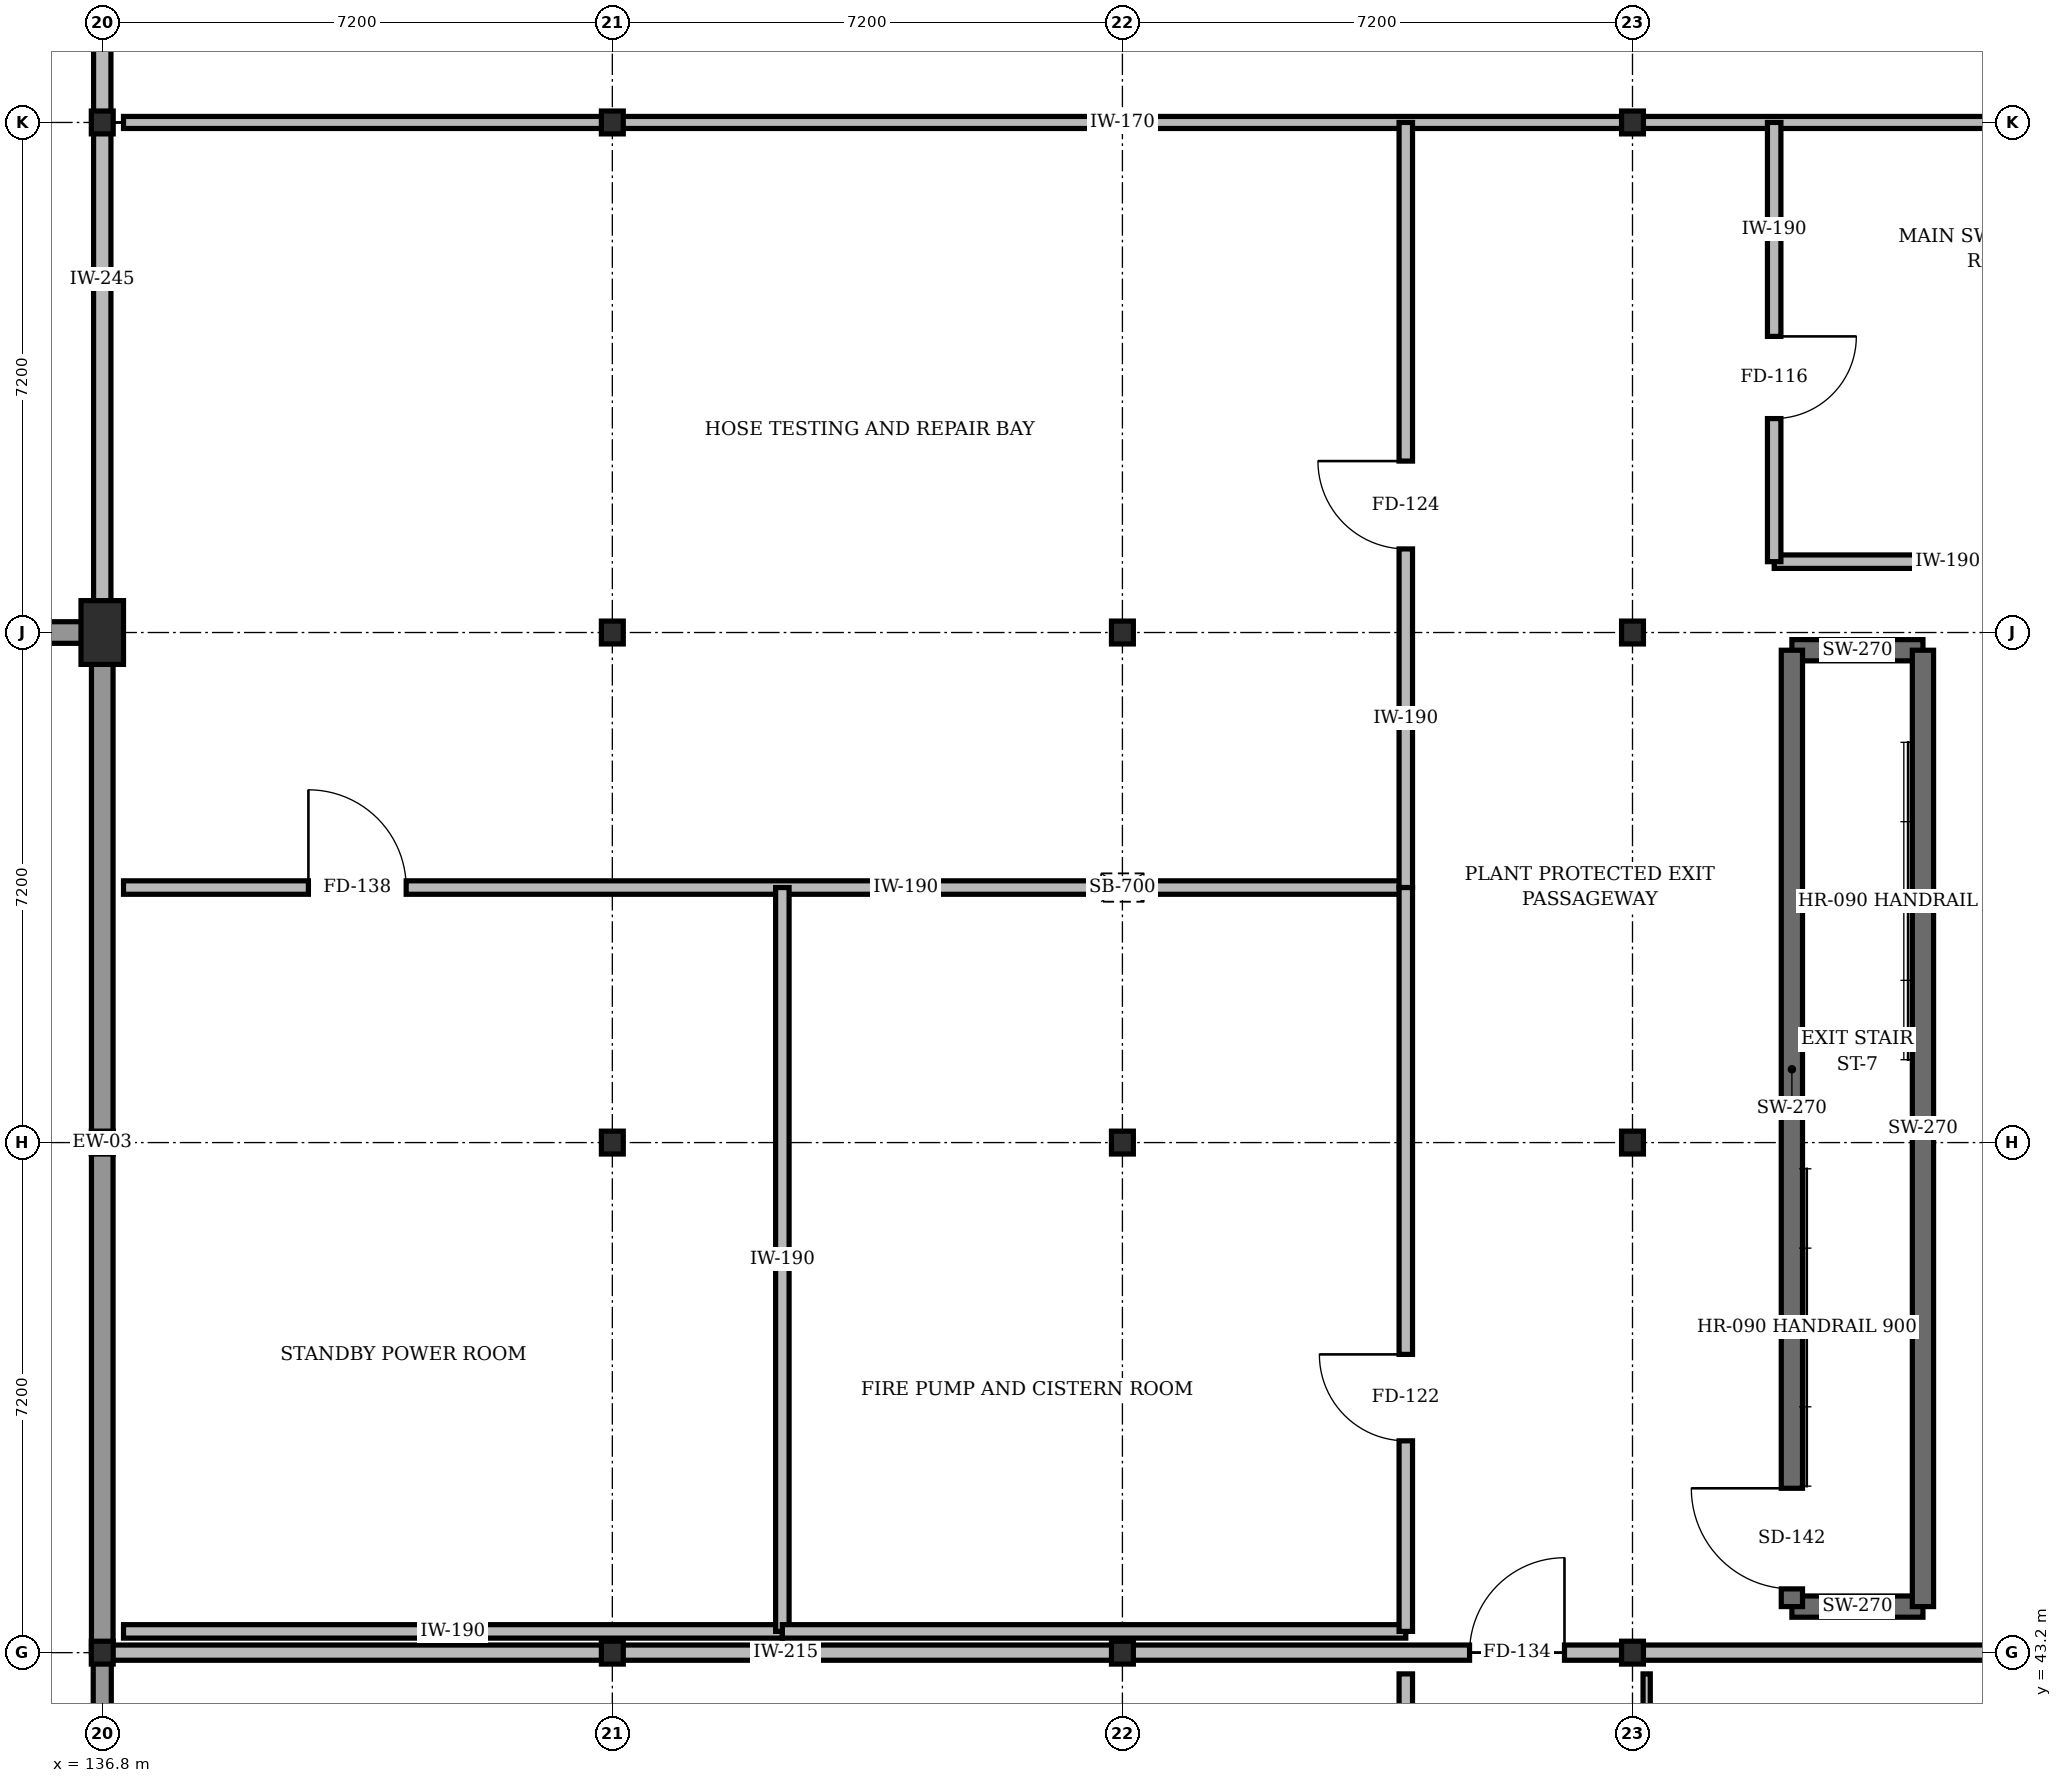
"""IFC4 building model, lengths in metres.
Left out: names, types, materials, properties, quantities, classifications, styles, units other than length and angle.
Written with IfcOpenShell. Run it as: python <this file> out.ifc"""

import sys

from ifc_helpers import new_model, si_unit, direction, frame, frame_2d, origin, origin_2d, place, context, subcontext, project, spatial, rectangle, i_section, extrude, element, fill, save


model = new_model("IFC4")
c1 = context("Model", 3, precision=1e-05, world=origin(), true_north=direction((0.0, 1.0)))
c2 = subcontext(c1, "Body", "Model", "MODEL_VIEW")
j1 = project(units=[si_unit("LENGTHUNIT", "METRE"), si_unit("PLANEANGLEUNIT", "RADIAN")], contexts=[c1])
p1 = place(None, origin())
s1 = spatial("IfcSite", under=j1, at=p1, CompositionType="ELEMENT")
p2 = place(p1, origin())
s2 = spatial("IfcBuilding", under=s1, at=p2, CompositionType="ELEMENT")
p3 = place(p2, origin())
s3 = spatial("IfcBuildingStorey", under=s2, at=p3, CompositionType="ELEMENT", Elevation=0.0)
for number, where, z_axis, x_axis in (
    (1, (136.8, 43.2, 0.0), (0.0, 0.0, 1.0), (1.0, 0.0, 0.0)),
    (2, (136.8, 50.4, 0.0), (0.0, 0.0, 1.0), (1.0, 0.0, 0.0)),
):
    element("IfcColumn", number, at=place(p3, frame(where, z_axis=z_axis, x_axis=x_axis)), inside=s3, PredefinedType="COLUMN", context=c2, shape_type="SweptSolid", body=[
        extrude(i_section(OverallWidth=0.309, OverallDepth=0.323, WebThickness=0.014, FlangeThickness=0.023, at=origin_2d()), origin(), (0.0, 0.0, 1.0), 6.0),
    ])
p4 = place(p3, frame((136.8, 57.6, 0.0), z_axis=(0.0, 0.0, 1.0), x_axis=(1.0, 0.0, 0.0)))
e3 = element("IfcColumn", 3, at=p4, inside=s3, PredefinedType="PILASTER", context=c2, shape_type="SweptSolid", body=[
    extrude(rectangle(XDim=0.6, YDim=0.9, at=origin_2d()), origin(), (0.0, 0.0, 1.0), 6.0),
])
for number, where, z_axis, x_axis in (
    (4, (136.8, 64.8, 0.0), (0.0, 0.0, 1.0), (1.0, 0.0, 0.0)),
    (5, (144.0, 43.2, 0.0), (0.0, 0.0, 1.0), (1.0, 0.0, 0.0)),
    (6, (144.0, 50.4, 0.0), (0.0, 0.0, 1.0), (1.0, 0.0, 0.0)),
    (7, (144.0, 57.6, 0.0), (0.0, 0.0, 1.0), (1.0, 0.0, 0.0)),
    (8, (144.0, 64.8, 0.0), (0.0, 0.0, 1.0), (1.0, 0.0, 0.0)),
    (9, (151.2, 43.2, 0.0), (0.0, 0.0, 1.0), (1.0, 0.0, 0.0)),
    (10, (151.2, 50.4, 0.0), (0.0, 0.0, 1.0), (1.0, 0.0, 0.0)),
    (11, (151.2, 57.6, 0.0), (0.0, 0.0, 1.0), (1.0, 0.0, 0.0)),
    (12, (158.4, 43.2, 0.0), (0.0, 0.0, 1.0), (1.0, 0.0, 0.0)),
    (13, (158.4, 50.4, 0.0), (0.0, 0.0, 1.0), (1.0, 0.0, 0.0)),
    (14, (158.4, 57.6, 0.0), (0.0, 0.0, 1.0), (1.0, 0.0, 0.0)),
    (15, (158.4, 64.8, 0.0), (0.0, 0.0, 1.0), (1.0, 0.0, 0.0)),
):
    element("IfcColumn", number, at=place(p3, frame(where, z_axis=z_axis, x_axis=x_axis)), inside=s3, PredefinedType="COLUMN", context=c2, shape_type="SweptSolid", body=[
        extrude(i_section(OverallWidth=0.309, OverallDepth=0.323, WebThickness=0.014, FlangeThickness=0.023, at=origin_2d()), origin(), (0.0, 0.0, 1.0), 6.0),
    ])
p5 = place(p3, frame((136.8, 57.6, 0.0), z_axis=(0.0, 0.0, 1.0), x_axis=(-1.0, 0.0, 0.0)))
e16 = element("IfcWall", 16, at=p5, inside=s3, PredefinedType="STANDARD", context=c2, shape_type="SweptSolid", body=[
    extrude(rectangle(XDim=7.2, YDim=0.305, at=frame_2d((3.6, 0.0))), origin(), (0.0, 0.0, 1.0), 5.022),
])
p6 = place(p5, frame((2.63, 0.0, 0.0)))
e17 = element("IfcOpeningElement", 17, at=p6, cuts=e16, PredefinedType="OPENING", context=c2, shape_type="SweptSolid", body=[
    extrude(rectangle(XDim=1.94, YDim=2.38, at=frame_2d((0.97, 1.19))), frame((0.0, 0.162, 0.0), z_axis=(0.0, -1.0, 0.0), x_axis=(1.0, 0.0, 0.0)), (0.0, 0.0, 1.0), 0.325),
])
p7 = place(p3, frame((136.8, 57.6, 0.0), z_axis=(0.0, 0.0, 1.0), x_axis=(0.0, -1.0, 0.0)))
e18 = element("IfcWall", 18, at=p7, inside=s3, PredefinedType="STANDARD", context=c2, shape_type="SweptSolid", body=[
    extrude(rectangle(XDim=14.4, YDim=0.305, at=frame_2d((7.2, 0.0))), origin(), (0.0, 0.0, 1.0), 5.022),
])
p8 = place(p3, frame((136.8, 43.2, 0.0), z_axis=(0.0, 0.0, 1.0), x_axis=(0.0, -1.0, 0.0)))
e19 = element("IfcWall", 19, at=p8, inside=s3, PredefinedType="STANDARD", context=c2, shape_type="SweptSolid", body=[
    extrude(rectangle(XDim=28.8, YDim=0.255, at=frame_2d((14.4, 0.0))), origin(), (0.0, 0.0, 1.0), 5.022),
])
p9 = place(p8, frame((4.2, 0.0, 1.25)))
e20 = element("IfcOpeningElement", 20, at=p9, cuts=e19, PredefinedType="OPENING", context=c2, shape_type="SweptSolid", body=[
    extrude(rectangle(XDim=2.12, YDim=1.76, at=frame_2d((1.06, 0.88))), frame((0.0, 0.137, 0.0), z_axis=(0.0, -1.0, 0.0), x_axis=(1.0, 0.0, 0.0)), (0.0, 0.0, 1.0), 0.275),
])
p10 = place(p8, frame((10.8, 0.0, 1.25)))
e21 = element("IfcOpeningElement", 21, at=p10, cuts=e19, PredefinedType="OPENING", context=c2, shape_type="SweptSolid", body=[
    extrude(rectangle(XDim=2.12, YDim=1.76, at=frame_2d((1.06, 0.88))), frame((0.0, 0.137, 0.0), z_axis=(0.0, -1.0, 0.0), x_axis=(1.0, 0.0, 0.0)), (0.0, 0.0, 1.0), 0.275),
])
p11 = place(p8, frame((18.0, 0.0, 1.25)))
e22 = element("IfcOpeningElement", 22, at=p11, cuts=e19, PredefinedType="OPENING", context=c2, shape_type="SweptSolid", body=[
    extrude(rectangle(XDim=2.12, YDim=1.76, at=frame_2d((1.06, 0.88))), frame((0.0, 0.137, 0.0), z_axis=(0.0, -1.0, 0.0), x_axis=(1.0, 0.0, 0.0)), (0.0, 0.0, 1.0), 0.275),
])
p12 = place(p8, frame((24.2, 0.0, 1.25)))
e23 = element("IfcOpeningElement", 23, at=p12, cuts=e19, PredefinedType="OPENING", context=c2, shape_type="SweptSolid", body=[
    extrude(rectangle(XDim=2.12, YDim=1.76, at=frame_2d((1.06, 0.88))), frame((0.0, 0.137, 0.0), z_axis=(0.0, -1.0, 0.0), x_axis=(1.0, 0.0, 0.0)), (0.0, 0.0, 1.0), 0.275),
])
for number, where, z_axis, x_axis in (
    (24, (160.65, 43.85, 0.0), (0.0, 0.0, 1.0), (1.0, 0.0, 0.0)),
    (25, (162.5, 57.35, 0.0), (0.0, 0.0, 1.0), (-1.0, 0.0, 0.0)),
):
    element("IfcWall", number, at=place(p3, frame(where, z_axis=z_axis, x_axis=x_axis)), inside=s3, PredefinedType="SHEAR", context=c2, shape_type="SweptSolid", body=[
        extrude(rectangle(XDim=1.85, YDim=0.3, at=frame_2d((0.925, 0.0))), origin(), (0.0, 0.0, 1.0), 5.715),
    ])
p13 = place(p3, frame((160.65, 43.85, 0.0), z_axis=(0.0, 0.0, 1.0), x_axis=(0.0, 1.0, 0.0)))
e26 = element("IfcWall", 26, at=p13, inside=s3, PredefinedType="SHEAR", context=c2, shape_type="SweptSolid", body=[
    extrude(rectangle(XDim=13.5, YDim=0.3, at=frame_2d((6.75, 0.0))), origin(), (0.0, 0.0, 1.0), 5.715),
])
p14 = place(p13, frame((0.25, 0.0, 0.0)))
e27 = element("IfcOpeningElement", 27, at=p14, cuts=e26, PredefinedType="OPENING", context=c2, shape_type="SweptSolid", body=[
    extrude(rectangle(XDim=1.42, YDim=2.22, at=frame_2d((0.71, 1.11))), frame((0.0, 0.16, 0.0), z_axis=(0.0, -1.0, 0.0), x_axis=(1.0, 0.0, 0.0)), (0.0, 0.0, 1.0), 0.32),
])
p15 = place(p3, frame((162.5, 57.35, 0.0), z_axis=(0.0, 0.0, 1.0), x_axis=(0.0, -1.0, 0.0)))
e28 = element("IfcWall", 28, at=p15, inside=s3, PredefinedType="SHEAR", context=c2, shape_type="SweptSolid", body=[
    extrude(rectangle(XDim=13.5, YDim=0.3, at=frame_2d((6.75, 0.0))), origin(), (0.0, 0.0, 1.0), 5.715),
])
p16 = place(p3, frame((136.8, 57.6, 0.0), z_axis=(0.0, 0.0, 1.0), x_axis=(0.0, 1.0, 0.0)))
e29 = element("IfcWall", 29, at=p16, inside=s3, PredefinedType="STANDARD", context=c2, shape_type="SweptSolid", body=[
    extrude(rectangle(XDim=36.0, YDim=0.245, at=frame_2d((18.0, 0.0))), origin(), (0.0, 0.0, 1.0), 5.022),
])
p17 = place(p16, frame((9.97, 0.0, 0.0)))
e30 = element("IfcOpeningElement", 30, at=p17, cuts=e29, PredefinedType="OPENING", context=c2, shape_type="SweptSolid", body=[
    extrude(rectangle(XDim=1.66, YDim=2.3, at=frame_2d((0.83, 1.15))), frame((0.0, 0.133, 0.0), z_axis=(0.0, -1.0, 0.0), x_axis=(1.0, 0.0, 0.0)), (0.0, 0.0, 1.0), 0.265),
])
p18 = place(p3, frame((136.8, 43.2, 0.0), z_axis=(0.0, 0.0, 1.0), x_axis=(1.0, 0.0, 0.0)))
e31 = element("IfcWall", 31, at=p18, inside=s3, PredefinedType="STANDARD", context=c2, shape_type="SweptSolid", body=[
    extrude(rectangle(XDim=28.8, YDim=0.215, at=frame_2d((14.4, 0.0))), origin(), (0.0, 0.0, 1.0), 5.022),
])
p19 = place(p18, frame((19.3, 0.0, 0.0)))
e32 = element("IfcOpeningElement", 32, at=p19, cuts=e31, PredefinedType="OPENING", context=c2, shape_type="SweptSolid", body=[
    extrude(rectangle(XDim=1.34, YDim=2.24, at=frame_2d((0.67, 1.12))), frame((0.0, 0.117, 0.0), z_axis=(0.0, -1.0, 0.0), x_axis=(1.0, 0.0, 0.0)), (0.0, 0.0, 1.0), 0.235),
])
p20 = place(p3, frame((137.1, 64.8, 0.0), z_axis=(0.0, 0.0, 1.0), x_axis=(1.0, 0.0, 0.0)))
e33 = element("IfcWall", 33, at=p20, inside=s3, PredefinedType="STANDARD", context=c2, shape_type="SweptSolid", body=[
    extrude(rectangle(XDim=28.2, YDim=0.17, at=frame_2d((14.1, 0.0))), origin(), (0.0, 0.0, 1.0), 4.864),
])
p21 = place(p3, frame((137.1, 54.0, 0.0), z_axis=(0.0, 0.0, 1.0), x_axis=(1.0, 0.0, 0.0)))
e34 = element("IfcWall", 34, at=p21, inside=s3, PredefinedType="STANDARD", context=c2, shape_type="SweptSolid", body=[
    extrude(rectangle(XDim=18.1, YDim=0.19, at=frame_2d((9.05, 0.0))), origin(), (0.0, 0.0, 1.0), 5.103),
])
p22 = place(p21, frame((2.61, 0.0, 0.0)))
e35 = element("IfcOpeningElement", 35, at=p22, cuts=e34, PredefinedType="OPENING", context=c2, shape_type="SweptSolid", body=[
    extrude(rectangle(XDim=1.38, YDim=2.24, at=frame_2d((0.69, 1.12))), frame((0.0, 0.105, 0.0), z_axis=(0.0, -1.0, 0.0), x_axis=(1.0, 0.0, 0.0)), (0.0, 0.0, 1.0), 0.21),
])
p23 = place(p3, frame((155.2, 54.0, 0.0), z_axis=(0.0, 0.0, 1.0), x_axis=(0.0, 1.0, 0.0)))
e36 = element("IfcWall", 36, at=p23, inside=s3, PredefinedType="STANDARD", context=c2, shape_type="SweptSolid", body=[
    extrude(rectangle(XDim=10.8, YDim=0.19, at=frame_2d((5.4, 0.0))), origin(), (0.0, 0.0, 1.0), 4.864),
])
p24 = place(p23, frame((4.78, 0.0, 0.0)))
e37 = element("IfcOpeningElement", 37, at=p24, cuts=e36, PredefinedType="OPENING", context=c2, shape_type="SweptSolid", body=[
    extrude(rectangle(XDim=1.24, YDim=2.2, at=frame_2d((0.62, 1.1))), frame((0.0, 0.105, 0.0), z_axis=(0.0, -1.0, 0.0), x_axis=(1.0, 0.0, 0.0)), (0.0, 0.0, 1.0), 0.21),
])
p25 = place(p3, frame((137.1, 43.5, 0.0), z_axis=(0.0, 0.0, 1.0), x_axis=(1.0, 0.0, 0.0)))
e38 = element("IfcWall", 38, at=p25, inside=s3, PredefinedType="STANDARD", context=c2, shape_type="SweptSolid", body=[
    extrude(rectangle(XDim=9.3, YDim=0.19, at=frame_2d((4.65, 0.0))), origin(), (0.0, 0.0, 1.0), 5.103),
])
p26 = place(p3, frame((146.4, 43.5, 0.0), z_axis=(0.0, 0.0, 1.0), x_axis=(0.0, 1.0, 0.0)))
e39 = element("IfcWall", 39, at=p26, inside=s3, PredefinedType="STANDARD", context=c2, shape_type="SweptSolid", body=[
    extrude(rectangle(XDim=10.5, YDim=0.19, at=frame_2d((5.25, 0.0))), origin(), (0.0, 0.0, 1.0), 5.022),
])
p27 = place(p3, frame((146.4, 43.5, 0.0), z_axis=(0.0, 0.0, 1.0), x_axis=(1.0, 0.0, 0.0)))
e40 = element("IfcWall", 40, at=p27, inside=s3, PredefinedType="STANDARD", context=c2, shape_type="SweptSolid", body=[
    extrude(rectangle(XDim=8.8, YDim=0.19, at=frame_2d((4.4, 0.0))), origin(), (0.0, 0.0, 1.0), 5.103),
])
p28 = place(p3, frame((155.2, 43.5, 0.0), z_axis=(0.0, 0.0, 1.0), x_axis=(0.0, 1.0, 0.0)))
e41 = element("IfcWall", 41, at=p28, inside=s3, PredefinedType="STANDARD", context=c2, shape_type="SweptSolid", body=[
    extrude(rectangle(XDim=10.5, YDim=0.19, at=frame_2d((5.25, 0.0))), origin(), (0.0, 0.0, 1.0), 5.022),
])
p29 = place(p28, frame((2.69, 0.0, 0.0)))
e42 = element("IfcOpeningElement", 42, at=p29, cuts=e41, PredefinedType="OPENING", context=c2, shape_type="SweptSolid", body=[
    extrude(rectangle(XDim=1.22, YDim=2.2, at=frame_2d((0.61, 1.1))), frame((0.0, 0.105, 0.0), z_axis=(0.0, -1.0, 0.0), x_axis=(1.0, 0.0, 0.0)), (0.0, 0.0, 1.0), 0.21),
])
p30 = place(p3, frame((160.4, 58.6, 0.0), z_axis=(0.0, 0.0, 1.0), x_axis=(1.0, 0.0, 0.0)))
e43 = element("IfcWall", 43, at=p30, inside=s3, PredefinedType="STANDARD", context=c2, shape_type="SweptSolid", body=[
    extrude(rectangle(XDim=4.9, YDim=0.19, at=frame_2d((2.45, 0.0))), origin(), (0.0, 0.0, 1.0), 5.258),
])
p31 = place(p3, frame((160.4, 64.8, 0.0), z_axis=(0.0, 0.0, 1.0), x_axis=(0.0, -1.0, 0.0)))
e44 = element("IfcWall", 44, at=p31, inside=s3, PredefinedType="STANDARD", context=c2, shape_type="SweptSolid", body=[
    extrude(rectangle(XDim=6.2, YDim=0.19, at=frame_2d((3.1, 0.0))), origin(), (0.0, 0.0, 1.0), 5.022),
])
p32 = place(p31, frame((3.02, 0.0, 0.0)))
e45 = element("IfcOpeningElement", 45, at=p32, cuts=e44, PredefinedType="OPENING", context=c2, shape_type="SweptSolid", body=[
    extrude(rectangle(XDim=1.16, YDim=2.18, at=frame_2d((0.58, 1.09))), frame((0.0, 0.105, 0.0), z_axis=(0.0, -1.0, 0.0), x_axis=(1.0, 0.0, 0.0)), (0.0, 0.0, 1.0), 0.21),
])
p33 = place(p3, frame((155.2, 14.7, 0.0), z_axis=(0.0, 0.0, 1.0), x_axis=(0.0, 1.0, 0.0)))
e46 = element("IfcWall", 46, at=p33, inside=s3, PredefinedType="STANDARD", context=c2, shape_type="SweptSolid", body=[
    extrude(rectangle(XDim=28.2, YDim=0.19, at=frame_2d((14.1, 0.0))), origin(), (0.0, 0.0, 1.0), 5.022),
])
p34 = place(p33, frame((9.79, 0.0, 0.0)))
e47 = element("IfcOpeningElement", 47, at=p34, cuts=e46, PredefinedType="OPENING", context=c2, shape_type="SweptSolid", body=[
    extrude(rectangle(XDim=1.42, YDim=2.26, at=frame_2d((0.71, 1.13))), frame((0.0, 0.105, 0.0), z_axis=(0.0, -1.0, 0.0), x_axis=(1.0, 0.0, 0.0)), (0.0, 0.0, 1.0), 0.21),
])
p35 = place(p3, frame((158.6, 42.9, 0.0), z_axis=(0.0, 0.0, 1.0), x_axis=(0.0, -1.0, 0.0)))
e48 = element("IfcWall", 48, at=p35, inside=s3, PredefinedType="STANDARD", context=c2, shape_type="SweptSolid", body=[
    extrude(rectangle(XDim=17.7, YDim=0.102, at=frame_2d((8.85, 0.0))), origin(), (0.0, 0.0, 1.0), 5.022),
])
p36 = place(p35, frame((9.96, 0.0, 0.0)))
e49 = element("IfcOpeningElement", 49, at=p36, cuts=e48, PredefinedType="OPENING", context=c2, shape_type="SweptSolid", body=[
    extrude(rectangle(XDim=1.08, YDim=2.18, at=frame_2d((0.54, 1.09))), frame((0.0, 0.061, 0.0), z_axis=(0.0, -1.0, 0.0), x_axis=(1.0, 0.0, 0.0)), (0.0, 0.0, 1.0), 0.122),
])
p37 = place(p14, origin())
e50 = element("IfcDoor", 50, at=p37, inside=s3, OperationType="SINGLE_SWING_RIGHT", PredefinedType="DOOR", context=c2, shape_type="SweptSolid", body=[
    extrude(rectangle(XDim=1.42, YDim=2.22, at=frame_2d((0.71, 1.11))), frame((0.0, 0.025, 0.0), z_axis=(0.0, -1.0, 0.0), x_axis=(1.0, 0.0, 0.0)), (0.0, 0.0, 1.0), 0.05),
])
fill(e27, e50)
p38 = place(p19, origin())
e51 = element("IfcDoor", 51, at=p38, inside=s3, OperationType="SINGLE_SWING_RIGHT", PredefinedType="DOOR", context=c2, shape_type="SweptSolid", body=[
    extrude(rectangle(XDim=1.34, YDim=2.24, at=frame_2d((0.67, 1.12))), frame((0.0, 0.025, 0.0), z_axis=(0.0, -1.0, 0.0), x_axis=(1.0, 0.0, 0.0)), (0.0, 0.0, 1.0), 0.05),
])
fill(e32, e51)
p39 = place(p24, origin())
e52 = element("IfcDoor", 52, at=p39, inside=s3, OperationType="SINGLE_SWING_RIGHT", PredefinedType="DOOR", context=c2, shape_type="SweptSolid", body=[
    extrude(rectangle(XDim=1.24, YDim=2.2, at=frame_2d((0.62, 1.1))), frame((0.0, 0.025, 0.0), z_axis=(0.0, -1.0, 0.0), x_axis=(1.0, 0.0, 0.0)), (0.0, 0.0, 1.0), 0.05),
])
fill(e37, e52)
p40 = place(p22, origin())
e53 = element("IfcDoor", 53, at=p40, inside=s3, OperationType="SINGLE_SWING_LEFT", PredefinedType="DOOR", context=c2, shape_type="SweptSolid", body=[
    extrude(rectangle(XDim=1.38, YDim=2.24, at=frame_2d((0.69, 1.12))), frame((0.0, 0.025, 0.0), z_axis=(0.0, -1.0, 0.0), x_axis=(1.0, 0.0, 0.0)), (0.0, 0.0, 1.0), 0.05),
])
fill(e35, e53)
p41 = place(p29, origin())
e54 = element("IfcDoor", 54, at=p41, inside=s3, OperationType="SINGLE_SWING_RIGHT", PredefinedType="DOOR", context=c2, shape_type="SweptSolid", body=[
    extrude(rectangle(XDim=1.22, YDim=2.2, at=frame_2d((0.61, 1.1))), frame((0.0, 0.025, 0.0), z_axis=(0.0, -1.0, 0.0), x_axis=(1.0, 0.0, 0.0)), (0.0, 0.0, 1.0), 0.05),
])
fill(e42, e54)
p42 = place(p32, origin())
e55 = element("IfcDoor", 55, at=p42, inside=s3, OperationType="SINGLE_SWING_LEFT", PredefinedType="DOOR", context=c2, shape_type="SweptSolid", body=[
    extrude(rectangle(XDim=1.16, YDim=2.18, at=frame_2d((0.58, 1.09))), frame((0.0, 0.025, 0.0), z_axis=(0.0, -1.0, 0.0), x_axis=(1.0, 0.0, 0.0)), (0.0, 0.0, 1.0), 0.05),
])
fill(e45, e55)
save(model, sys.argv[1])
